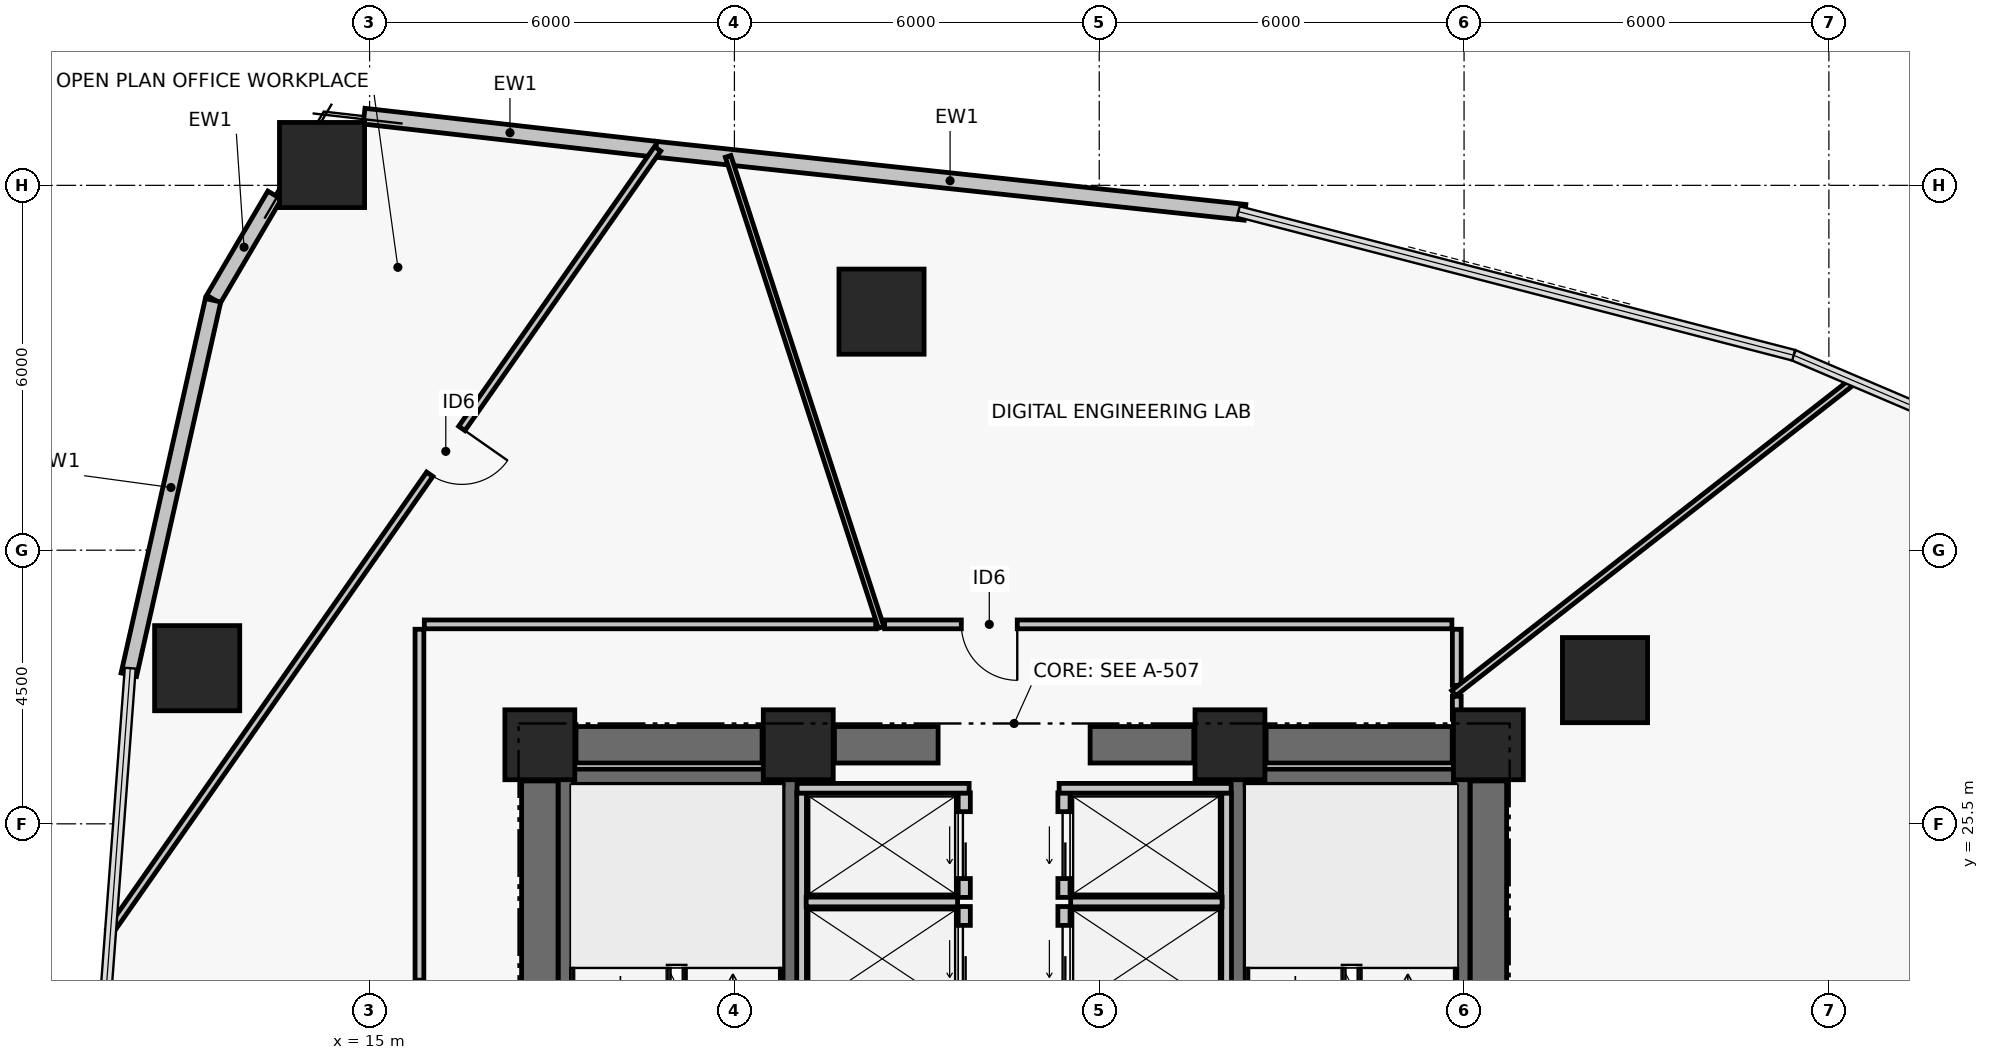
"""IFC4 building model, lengths in metres.
Left out: names, types, materials, properties, quantities, classifications, styles, units other than length and angle.
Written with IfcOpenShell. Run it as: python <this file> out.ifc"""

import sys

from ifc_helpers import new_model, si_unit, direction, frame, frame_2d, origin, origin_2d, place, context, subcontext, project, spatial, rectangle, hollow_rectangle, extrude, element, fill, save


model = new_model("IFC4")
c1 = context("Model", 3, precision=1e-05, world=origin(), true_north=direction((0.0, 1.0)))
c2 = subcontext(c1, "Body", "Model", "MODEL_VIEW")
j1 = project(units=[si_unit("LENGTHUNIT", "METRE"), si_unit("PLANEANGLEUNIT", "RADIAN")], contexts=[c1])
p1 = place(None, origin())
s1 = spatial("IfcSite", under=j1, at=p1, CompositionType="ELEMENT")
p2 = place(p1, origin())
s2 = spatial("IfcBuilding", under=s1, at=p2, CompositionType="ELEMENT")
p3 = place(p2, frame((0.0, 0.0, 61.08)))
s3 = spatial("IfcBuildingStorey", under=s2, at=p3, CompositionType="ELEMENT", Elevation=61.08)
for number, where, z_axis, x_axis in (
    (1, (17.8, 26.8, 0.0), (0.0, 0.0, 1.0), (1.0, 0.0, 0.0)),
    (2, (22.05, 26.8, 0.0), (0.0, 0.0, 1.0), (1.0, 0.0, 0.0)),
    (3, (29.15, 26.8, 0.0), (0.0, 0.0, 1.0), (1.0, 0.0, 0.0)),
    (4, (33.4, 26.8, 0.0), (0.0, 0.0, 1.0), (1.0, 0.0, 0.0)),
):
    element("IfcColumn", number, at=place(p3, frame(where, z_axis=z_axis, x_axis=x_axis)), inside=s3, PredefinedType="COLUMN", context=c2, shape_type="SweptSolid", body=[
        extrude(rectangle(XDim=1.15, YDim=1.15, at=origin_2d()), origin(), (0.0, 0.0, 1.0), 3.72),
    ])
p4 = place(p3, frame((18.395, 26.8, 0.0), z_axis=(0.0, 0.0, 1.0), x_axis=(1.0, 0.0, 0.0)))
e5 = element("IfcWall", 5, at=p4, inside=s3, PredefinedType="SHEAR", context=c2, shape_type="SweptSolid", body=[
    extrude(rectangle(XDim=3.06, YDim=0.6, at=frame_2d((1.53, 0.0))), origin(), (0.0, 0.0, 1.0), 3.47),
])
p5 = place(p3, frame((22.645, 26.8, 0.0), z_axis=(0.0, 0.0, 1.0), x_axis=(1.0, 0.0, 0.0)))
e6 = element("IfcWall", 6, at=p5, inside=s3, PredefinedType="SHEAR", context=c2, shape_type="SweptSolid", body=[
    extrude(rectangle(XDim=1.705, YDim=0.6, at=frame_2d((0.853, 0.0))), origin(), (0.0, 0.0, 1.0), 3.47),
])
p6 = place(p3, frame((26.85, 26.8, 0.0), z_axis=(0.0, 0.0, 1.0), x_axis=(1.0, 0.0, 0.0)))
e7 = element("IfcWall", 7, at=p6, inside=s3, PredefinedType="SHEAR", context=c2, shape_type="SweptSolid", body=[
    extrude(rectangle(XDim=1.705, YDim=0.6, at=frame_2d((0.853, 0.0))), origin(), (0.0, 0.0, 1.0), 3.47),
])
p7 = place(p3, frame((29.745, 26.8, 0.0), z_axis=(0.0, 0.0, 1.0), x_axis=(1.0, 0.0, 0.0)))
e8 = element("IfcWall", 8, at=p7, inside=s3, PredefinedType="SHEAR", context=c2, shape_type="SweptSolid", body=[
    extrude(rectangle(XDim=3.06, YDim=0.6, at=frame_2d((1.53, 0.0))), origin(), (0.0, 0.0, 1.0), 3.47),
])
for number, where, z_axis, x_axis in (
    (9, (17.8, 17.795, 0.0), (0.0, 0.0, 1.0), (0.0, 1.0, 0.0)),
    (10, (33.4, 17.795, 0.0), (0.0, 0.0, 1.0), (0.0, 1.0, 0.0)),
):
    element("IfcWall", number, at=place(p3, frame(where, z_axis=z_axis, x_axis=x_axis)), inside=s3, PredefinedType="SHEAR", context=c2, shape_type="SweptSolid", body=[
        extrude(rectangle(XDim=8.41, YDim=0.6, at=frame_2d((4.205, 0.0))), origin(), (0.0, 0.0, 1.0), 3.47),
    ])
p8 = place(p3, frame((18.229, 17.6, 0.0), z_axis=(0.0, 0.0, 1.0), x_axis=(0.0, 1.0, 0.0)))
e11 = element("IfcWall", 11, at=p8, inside=s3, PredefinedType="SHEAR", context=c2, shape_type="SweptSolid", body=[
    extrude(rectangle(XDim=8.8, YDim=0.25, at=frame_2d((4.4, 0.0))), origin(), (0.0, 0.0, 1.0), 3.47),
])
p9 = place(p3, frame((21.925, 17.6, 0.0), z_axis=(0.0, 0.0, 1.0), x_axis=(0.0, 1.0, 0.0)))
e12 = element("IfcWall", 12, at=p9, inside=s3, PredefinedType="SHEAR", context=c2, shape_type="SweptSolid", body=[
    extrude(rectangle(XDim=8.8, YDim=0.25, at=frame_2d((4.4, 0.0))), origin(), (0.0, 0.0, 1.0), 3.47),
])
p10 = place(p9, frame((0.35, 0.0, 0.0)))
e13 = element("IfcOpeningElement", 13, at=p10, cuts=e12, PredefinedType="OPENING", context=c2, shape_type="SweptSolid", body=[
    extrude(rectangle(XDim=1.05, YDim=2.08, at=frame_2d((0.525, 1.04))), frame((0.0, 0.135, 0.0), z_axis=(0.0, -1.0, 0.0), x_axis=(1.0, 0.0, 0.0)), (0.0, 0.0, 1.0), 0.27),
])
p11 = place(p3, frame((18.354, 26.275, 0.0), z_axis=(0.0, 0.0, 1.0), x_axis=(1.0, 0.0, 0.0)))
e14 = element("IfcWall", 14, at=p11, inside=s3, PredefinedType="SHEAR", context=c2, shape_type="SweptSolid", body=[
    extrude(rectangle(XDim=3.446, YDim=0.25, at=frame_2d((1.723, 0.0))), origin(), (0.0, 0.0, 1.0), 3.47),
])
p12 = place(p3, frame((29.275, 17.6, 0.0), z_axis=(0.0, 0.0, 1.0), x_axis=(0.0, 1.0, 0.0)))
e15 = element("IfcWall", 15, at=p12, inside=s3, PredefinedType="SHEAR", context=c2, shape_type="SweptSolid", body=[
    extrude(rectangle(XDim=8.8, YDim=0.25, at=frame_2d((4.4, 0.0))), origin(), (0.0, 0.0, 1.0), 3.47),
])
p13 = place(p12, frame((0.35, 0.0, 0.0)))
e16 = element("IfcOpeningElement", 16, at=p13, cuts=e15, PredefinedType="OPENING", context=c2, shape_type="SweptSolid", body=[
    extrude(rectangle(XDim=1.05, YDim=2.08, at=frame_2d((0.525, 1.04))), frame((0.0, 0.135, 0.0), z_axis=(0.0, -1.0, 0.0), x_axis=(1.0, 0.0, 0.0)), (0.0, 0.0, 1.0), 0.27),
])
p14 = place(p3, frame((32.971, 17.6, 0.0), z_axis=(0.0, 0.0, 1.0), x_axis=(0.0, 1.0, 0.0)))
e17 = element("IfcWall", 17, at=p14, inside=s3, PredefinedType="SHEAR", context=c2, shape_type="SweptSolid", body=[
    extrude(rectangle(XDim=8.8, YDim=0.25, at=frame_2d((4.4, 0.0))), origin(), (0.0, 0.0, 1.0), 3.47),
])
p15 = place(p3, frame((29.4, 26.275, 0.0), z_axis=(0.0, 0.0, 1.0), x_axis=(1.0, 0.0, 0.0)))
e18 = element("IfcWall", 18, at=p15, inside=s3, PredefinedType="SHEAR", context=c2, shape_type="SweptSolid", body=[
    extrude(rectangle(XDim=3.446, YDim=0.25, at=frame_2d((1.723, 0.0))), origin(), (0.0, 0.0, 1.0), 3.47),
])
for number, where, z_axis, x_axis in (
    (19, (35.318, 27.863, 0.0), (0.0, 0.0, 1.0), (1.0, 0.0, 0.0)),
    (20, (23.419, 33.923, 0.0), (0.0, 0.0, 1.0), (1.0, 0.0, 0.0)),
    (21, (14.218, 36.334, 0.0), (0.0, 0.0, 1.0), (1.0, 0.0, 0.0)),
    (22, (12.164, 28.06, 0.0), (0.0, 0.0, 1.0), (1.0, 0.0, 0.0)),
):
    element("IfcColumn", number, at=place(p3, frame(where, z_axis=z_axis, x_axis=x_axis)), inside=s3, PredefinedType="COLUMN", context=c2, shape_type="SweptSolid", body=[
        extrude(hollow_rectangle(XDim=1.4, YDim=1.4, WallThickness=0.055, at=origin_2d()), origin(), (0.0, 0.0, 1.0), 3.72),
    ])
p16 = place(p3, frame((19.696, 36.595, 0.0), z_axis=(0.0, 0.0, 1.0), x_axis=(0.994319088673, -0.106440358419, 0.0)))
e23 = element("IfcWall", 23, at=p16, inside=s3, PredefinedType="PARTITIONING", context=c2, shape_type="SweptSolid", body=[
    extrude(rectangle(XDim=9.757, YDim=0.26, at=frame_2d((4.879, 0.0))), origin(), (0.0, 0.0, 1.0), 3.47),
])
p17 = place(p3, frame((14.909, 37.138, 0.0), z_axis=(0.0, 0.0, 1.0), x_axis=(0.993630237788, -0.112689620435, 0.0)))
e24 = element("IfcWall", 24, at=p17, inside=s3, PredefinedType="PARTITIONING", context=c2, shape_type="SweptSolid", body=[
    extrude(rectangle(XDim=4.829, YDim=0.26, at=frame_2d((2.415, 0.0))), origin(), (0.0, 0.0, 1.0), 3.47),
])
p18 = place(p3, frame((12.432, 34.127, 0.0), z_axis=(0.0, 0.0, 1.0), x_axis=(0.506772954594, 0.862079562739, 0.0)))
e25 = element("IfcWall", 25, at=p18, inside=s3, PredefinedType="PARTITIONING", context=c2, shape_type="SweptSolid", body=[
    extrude(rectangle(XDim=1.986, YDim=0.26, at=frame_2d((0.993, 0.0))), origin(), (0.0, 0.0, 1.0), 3.47),
])
p19 = place(p3, frame((11.04, 27.952, 0.0), z_axis=(0.0, 0.0, 1.0), x_axis=(0.219505752381, 0.975611205692, 0.0)))
e26 = element("IfcWall", 26, at=p19, inside=s3, PredefinedType="PARTITIONING", context=c2, shape_type="SweptSolid", body=[
    extrude(rectangle(XDim=6.312, YDim=0.26, at=frame_2d((3.156, 0.0))), origin(), (0.0, 0.0, 1.0), 3.47),
])
p20 = place(p3, frame((24.78, 22.42, 0.0), z_axis=(0.0, 0.0, 1.0), x_axis=(0.0, 1.0, 0.0)))
e27 = element("IfcWall", 27, at=p20, inside=s3, PredefinedType="PARTITIONING", context=c2, shape_type="SweptSolid", body=[
    extrude(rectangle(XDim=1.72, YDim=0.2, at=frame_2d((0.86, 0.0))), origin(), (0.0, 0.0, 1.0), 3.47),
])
p21 = place(p20, frame((0.31, 0.0, 0.0)))
e28 = element("IfcOpeningElement", 28, at=p21, cuts=e27, PredefinedType="OPENING", context=c2, shape_type="SweptSolid", body=[
    extrude(rectangle(XDim=1.1, YDim=2.08, at=frame_2d((0.55, 1.04))), frame((0.0, 0.11, 0.0), z_axis=(0.0, -1.0, 0.0), x_axis=(1.0, 0.0, 0.0)), (0.0, 0.0, 1.0), 0.22),
])
p22 = place(p3, frame((24.78, 24.29, 0.0), z_axis=(0.0, 0.0, 1.0), x_axis=(0.0, 1.0, 0.0)))
e29 = element("IfcWall", 29, at=p22, inside=s3, PredefinedType="PARTITIONING", context=c2, shape_type="SweptSolid", body=[
    extrude(rectangle(XDim=1.72, YDim=0.2, at=frame_2d((0.86, 0.0))), origin(), (0.0, 0.0, 1.0), 3.47),
])
p23 = place(p22, frame((0.31, 0.0, 0.0)))
e30 = element("IfcOpeningElement", 30, at=p23, cuts=e29, PredefinedType="OPENING", context=c2, shape_type="SweptSolid", body=[
    extrude(rectangle(XDim=1.1, YDim=2.08, at=frame_2d((0.55, 1.04))), frame((0.0, 0.11, 0.0), z_axis=(0.0, -1.0, 0.0), x_axis=(1.0, 0.0, 0.0)), (0.0, 0.0, 1.0), 0.22),
])
p24 = place(p3, frame((26.42, 22.42, 0.0), z_axis=(0.0, 0.0, 1.0), x_axis=(0.0, 1.0, 0.0)))
e31 = element("IfcWall", 31, at=p24, inside=s3, PredefinedType="PARTITIONING", context=c2, shape_type="SweptSolid", body=[
    extrude(rectangle(XDim=1.72, YDim=0.2, at=frame_2d((0.86, 0.0))), origin(), (0.0, 0.0, 1.0), 3.47),
])
p25 = place(p24, frame((0.31, 0.0, 0.0)))
e32 = element("IfcOpeningElement", 32, at=p25, cuts=e31, PredefinedType="OPENING", context=c2, shape_type="SweptSolid", body=[
    extrude(rectangle(XDim=1.1, YDim=2.08, at=frame_2d((0.55, 1.04))), frame((0.0, 0.11, 0.0), z_axis=(0.0, -1.0, 0.0), x_axis=(1.0, 0.0, 0.0)), (0.0, 0.0, 1.0), 0.22),
])
p26 = place(p3, frame((26.42, 24.29, 0.0), z_axis=(0.0, 0.0, 1.0), x_axis=(0.0, 1.0, 0.0)))
e33 = element("IfcWall", 33, at=p26, inside=s3, PredefinedType="PARTITIONING", context=c2, shape_type="SweptSolid", body=[
    extrude(rectangle(XDim=1.72, YDim=0.2, at=frame_2d((0.86, 0.0))), origin(), (0.0, 0.0, 1.0), 3.47),
])
p27 = place(p26, frame((0.31, 0.0, 0.0)))
e34 = element("IfcOpeningElement", 34, at=p27, cuts=e33, PredefinedType="OPENING", context=c2, shape_type="SweptSolid", body=[
    extrude(rectangle(XDim=1.1, YDim=2.08, at=frame_2d((0.55, 1.04))), frame((0.0, 0.11, 0.0), z_axis=(0.0, -1.0, 0.0), x_axis=(1.0, 0.0, 0.0)), (0.0, 0.0, 1.0), 0.22),
])
p28 = place(p3, frame((22.105, 20.56, 0.0), z_axis=(0.0, 0.0, 1.0), x_axis=(0.0, 1.0, 0.0)))
e35 = element("IfcWall", 35, at=p28, inside=s3, PredefinedType="PARTITIONING", context=c2, shape_type="SweptSolid", body=[
    extrude(rectangle(XDim=5.45, YDim=0.16, at=frame_2d((2.725, 0.0))), origin(), (0.0, 0.0, 1.0), 3.47),
])
p29 = place(p3, frame((22.18, 24.215, 0.0), z_axis=(0.0, 0.0, 1.0), x_axis=(1.0, 0.0, 0.0)))
e36 = element("IfcWall", 36, at=p29, inside=s3, PredefinedType="PARTITIONING", context=c2, shape_type="SweptSolid", body=[
    extrude(rectangle(XDim=2.49, YDim=0.16, at=frame_2d((1.245, 0.0))), origin(), (0.0, 0.0, 1.0), 3.47),
])
p30 = place(p3, frame((22.03, 26.085, 0.0), z_axis=(0.0, 0.0, 1.0), x_axis=(1.0, 0.0, 0.0)))
e37 = element("IfcWall", 37, at=p30, inside=s3, PredefinedType="PARTITIONING", context=c2, shape_type="SweptSolid", body=[
    extrude(rectangle(XDim=2.83, YDim=0.16, at=frame_2d((1.415, 0.0))), origin(), (0.0, 0.0, 1.0), 3.47),
])
p31 = place(p3, frame((29.095, 20.56, 0.0), z_axis=(0.0, 0.0, 1.0), x_axis=(0.0, 1.0, 0.0)))
e38 = element("IfcWall", 38, at=p31, inside=s3, PredefinedType="PARTITIONING", context=c2, shape_type="SweptSolid", body=[
    extrude(rectangle(XDim=5.45, YDim=0.16, at=frame_2d((2.725, 0.0))), origin(), (0.0, 0.0, 1.0), 3.47),
])
p32 = place(p3, frame((26.53, 24.215, 0.0), z_axis=(0.0, 0.0, 1.0), x_axis=(1.0, 0.0, 0.0)))
e39 = element("IfcWall", 39, at=p32, inside=s3, PredefinedType="PARTITIONING", context=c2, shape_type="SweptSolid", body=[
    extrude(rectangle(XDim=2.49, YDim=0.16, at=frame_2d((1.245, 0.0))), origin(), (0.0, 0.0, 1.0), 3.47),
])
p33 = place(p3, frame((26.34, 26.085, 0.0), z_axis=(0.0, 0.0, 1.0), x_axis=(1.0, 0.0, 0.0)))
e40 = element("IfcWall", 40, at=p33, inside=s3, PredefinedType="PARTITIONING", context=c2, shape_type="SweptSolid", body=[
    extrude(rectangle(XDim=2.83, YDim=0.16, at=frame_2d((1.415, 0.0))), origin(), (0.0, 0.0, 1.0), 3.47),
])
p34 = place(p3, frame((33.74, 27.22, 0.0), z_axis=(0.0, 0.0, 1.0), x_axis=(-1.0, 0.0, 0.0)))
e41 = element("IfcWall", 41, at=p34, inside=s3, PredefinedType="PARTITIONING", context=c2, shape_type="SweptSolid", body=[
    extrude(rectangle(XDim=0.86, YDim=0.145, at=frame_2d((0.43, 0.0))), origin(), (0.0, 0.0, 1.0), 2.6),
])
p35 = place(p3, frame((32.88, 27.22, 0.0), z_axis=(0.0, 0.0, 1.0), x_axis=(0.0, 1.0, 0.0)))
e42 = element("IfcWall", 42, at=p35, inside=s3, PredefinedType="PARTITIONING", context=c2, shape_type="SweptSolid", body=[
    extrude(rectangle(XDim=0.379, YDim=0.145, at=frame_2d((0.189, 0.0))), origin(), (0.0, 0.0, 1.0), 2.6),
])
p36 = place(p3, frame((32.88, 27.777, 0.0), z_axis=(0.0, 0.0, 1.0), x_axis=(0.0, 1.0, 0.0)))
e43 = element("IfcWall", 43, at=p36, inside=s3, PredefinedType="PARTITIONING", context=c2, shape_type="SweptSolid", body=[
    extrude(rectangle(XDim=0.923, YDim=0.145, at=frame_2d((0.462, 0.0))), origin(), (0.0, 0.0, 1.0), 3.0),
])
p37 = place(p3, frame((32.8, 28.78, 0.0), z_axis=(0.0, 0.0, 1.0), x_axis=(-1.0, 0.0, 0.0)))
e44 = element("IfcWall", 44, at=p37, inside=s3, PredefinedType="PARTITIONING", context=c2, shape_type="SweptSolid", body=[
    extrude(rectangle(XDim=9.329, YDim=0.145, at=frame_2d((4.665, 0.0))), origin(), (0.0, 0.0, 1.0), 3.0),
])
p38 = place(p37, frame((7.148, 0.0, 0.0)))
e45 = element("IfcOpeningElement", 45, at=p38, cuts=e44, PredefinedType="OPENING", context=c2, shape_type="SweptSolid", body=[
    extrude(rectangle(XDim=0.92, YDim=2.05, at=frame_2d((0.46, 1.025))), frame((0.0, 0.083, 0.0), z_axis=(0.0, -1.0, 0.0), x_axis=(1.0, 0.0, 0.0)), (0.0, 0.0, 1.0), 0.165),
])
p39 = place(p3, frame((23.323, 28.78, 0.0), z_axis=(0.0, 0.0, 1.0), x_axis=(-1.0, 0.0, 0.0)))
e46 = element("IfcWall", 46, at=p39, inside=s3, PredefinedType="PARTITIONING", context=c2, shape_type="SweptSolid", body=[
    extrude(rectangle(XDim=7.424, YDim=0.145, at=frame_2d((3.712, 0.0))), origin(), (0.0, 0.0, 1.0), 2.6),
])
p40 = place(p3, frame((15.82, 28.7, 0.0), z_axis=(0.0, 0.0, 1.0), x_axis=(0.0, -1.0, 0.0)))
e47 = element("IfcWall", 47, at=p40, inside=s3, PredefinedType="PARTITIONING", context=c2, shape_type="SweptSolid", body=[
    extrude(rectangle(XDim=6.971, YDim=0.145, at=frame_2d((3.486, 0.0))), origin(), (0.0, 0.0, 1.0), 2.6),
])
p41 = place(p40, frame((5.771, 0.0, 0.0)))
e48 = element("IfcOpeningElement", 48, at=p41, cuts=e47, PredefinedType="OPENING", context=c2, shape_type="SweptSolid", body=[
    extrude(rectangle(XDim=0.92, YDim=2.05, at=frame_2d((0.46, 1.025))), frame((0.0, 0.083, 0.0), z_axis=(0.0, -1.0, 0.0), x_axis=(1.0, 0.0, 0.0)), (0.0, 0.0, 1.0), 0.165),
])
p42 = place(p3, frame((32.83, 27.649, 0.0), z_axis=(0.0, 0.0, 1.0), x_axis=(0.78800045327, 0.615674658928, 0.0)))
e49 = element("IfcWall", 49, at=p42, inside=s3, PredefinedType="PARTITIONING", context=c2, shape_type="SweptSolid", body=[
    extrude(rectangle(XDim=8.356, YDim=0.11, at=frame_2d((4.178, 0.0))), origin(), (0.0, 0.0, 1.0), 2.85),
])
p43 = place(p3, frame((23.413, 28.73, 0.0), z_axis=(0.0, 0.0, 1.0), x_axis=(-0.309033883912, 0.951051028386, 0.0)))
e50 = element("IfcWall", 50, at=p43, inside=s3, PredefinedType="PARTITIONING", context=c2, shape_type="SweptSolid", body=[
    extrude(rectangle(XDim=8.145, YDim=0.095, at=frame_2d((4.073, 0.0))), origin(), (0.0, 0.0, 1.0), 2.6),
])
p44 = place(p3, frame((19.737, 36.601, 0.0), z_axis=(0.0, 0.0, 1.0), x_axis=(-0.573585467262, -0.819145720703, 0.0)))
e51 = element("IfcWall", 51, at=p44, inside=s3, PredefinedType="PARTITIONING", context=c2, shape_type="SweptSolid", body=[
    extrude(rectangle(XDim=15.703, YDim=0.125, at=frame_2d((7.851, 0.0))), origin(), (0.0, 0.0, 1.0), 2.6),
])
p45 = place(p44, frame((5.614, 0.0, 0.0)))
e52 = element("IfcOpeningElement", 52, at=p45, cuts=e51, PredefinedType="OPENING", context=c2, shape_type="SweptSolid", body=[
    extrude(rectangle(XDim=0.92, YDim=2.05, at=frame_2d((0.46, 1.025))), frame((0.0, 0.073, 0.0), z_axis=(0.0, -1.0, 0.0), x_axis=(1.0, 0.0, 0.0)), (0.0, 0.0, 1.0), 0.145),
])
p46 = place(p21, origin())
e53 = element("IfcDoor", 53, at=p46, inside=s3, OperationType="DOUBLE_DOOR_SLIDING", PredefinedType="DOOR", context=c2, shape_type="SweptSolid", body=[
    extrude(rectangle(XDim=1.1, YDim=2.08, at=frame_2d((0.55, 1.04))), frame((0.0, 0.025, 0.0), z_axis=(0.0, -1.0, 0.0), x_axis=(1.0, 0.0, 0.0)), (0.0, 0.0, 1.0), 0.05),
])
fill(e28, e53)
p47 = place(p23, origin())
e54 = element("IfcDoor", 54, at=p47, inside=s3, OperationType="DOUBLE_DOOR_SLIDING", PredefinedType="DOOR", context=c2, shape_type="SweptSolid", body=[
    extrude(rectangle(XDim=1.1, YDim=2.08, at=frame_2d((0.55, 1.04))), frame((0.0, 0.025, 0.0), z_axis=(0.0, -1.0, 0.0), x_axis=(1.0, 0.0, 0.0)), (0.0, 0.0, 1.0), 0.05),
])
fill(e30, e54)
p48 = place(p25, origin())
e55 = element("IfcDoor", 55, at=p48, inside=s3, OperationType="DOUBLE_DOOR_SLIDING", PredefinedType="DOOR", context=c2, shape_type="SweptSolid", body=[
    extrude(rectangle(XDim=1.1, YDim=2.08, at=frame_2d((0.55, 1.04))), frame((0.0, 0.025, 0.0), z_axis=(0.0, -1.0, 0.0), x_axis=(1.0, 0.0, 0.0)), (0.0, 0.0, 1.0), 0.05),
])
fill(e32, e55)
p49 = place(p27, origin())
e56 = element("IfcDoor", 56, at=p49, inside=s3, OperationType="DOUBLE_DOOR_SLIDING", PredefinedType="DOOR", context=c2, shape_type="SweptSolid", body=[
    extrude(rectangle(XDim=1.1, YDim=2.08, at=frame_2d((0.55, 1.04))), frame((0.0, 0.025, 0.0), z_axis=(0.0, -1.0, 0.0), x_axis=(1.0, 0.0, 0.0)), (0.0, 0.0, 1.0), 0.05),
])
fill(e34, e56)
p50 = place(p38, origin())
e57 = element("IfcDoor", 57, at=p50, inside=s3, OperationType="SINGLE_SWING_LEFT", PredefinedType="DOOR", context=c2, shape_type="SweptSolid", body=[
    extrude(rectangle(XDim=0.92, YDim=2.05, at=frame_2d((0.46, 1.025))), frame((0.0, 0.025, 0.0), z_axis=(0.0, -1.0, 0.0), x_axis=(1.0, 0.0, 0.0)), (0.0, 0.0, 1.0), 0.05),
])
fill(e45, e57)
p51 = place(p41, origin())
e58 = element("IfcDoor", 58, at=p51, inside=s3, OperationType="SINGLE_SWING_RIGHT", PredefinedType="DOOR", context=c2, shape_type="SweptSolid", body=[
    extrude(rectangle(XDim=0.92, YDim=2.05, at=frame_2d((0.46, 1.025))), frame((0.0, 0.025, 0.0), z_axis=(0.0, -1.0, 0.0), x_axis=(1.0, 0.0, 0.0)), (0.0, 0.0, 1.0), 0.05),
])
fill(e48, e58)
p52 = place(p45, origin())
e59 = element("IfcDoor", 59, at=p52, inside=s3, OperationType="SINGLE_SWING_LEFT", PredefinedType="DOOR", context=c2, shape_type="SweptSolid", body=[
    extrude(rectangle(XDim=0.92, YDim=2.05, at=frame_2d((0.46, 1.025))), frame((0.0, 0.025, 0.0), z_axis=(0.0, -1.0, 0.0), x_axis=(1.0, 0.0, 0.0)), (0.0, 0.0, 1.0), 0.05),
])
fill(e52, e59)
save(model, sys.argv[1])
